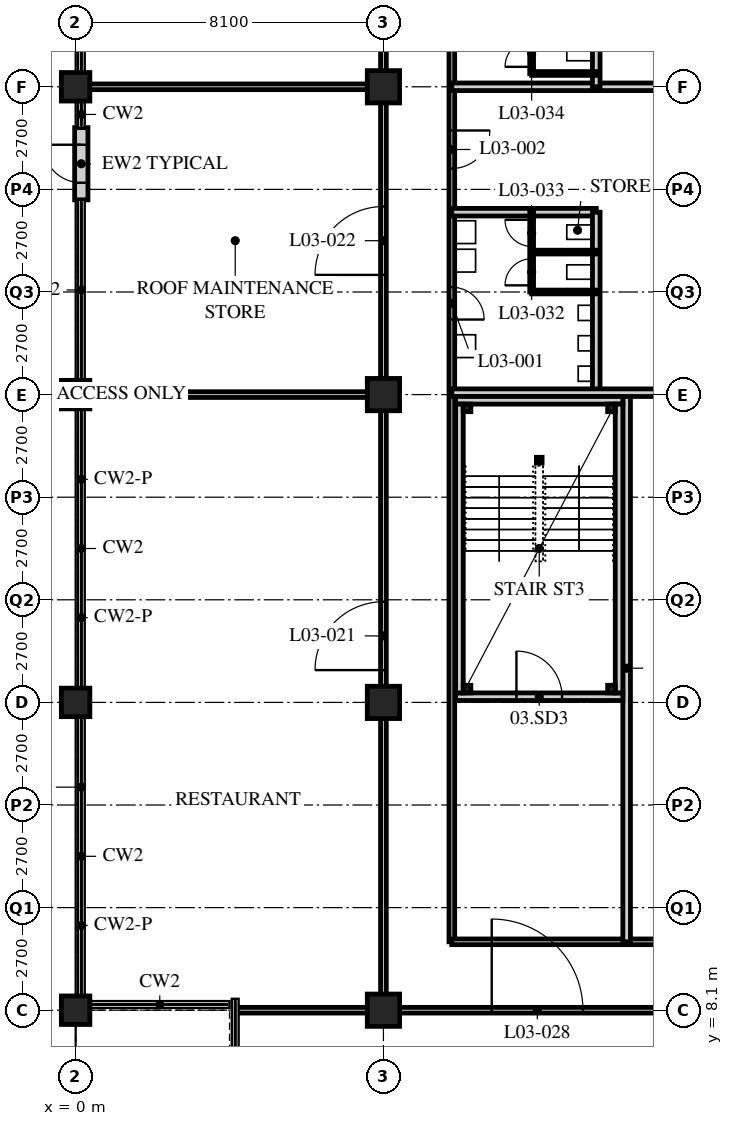
"""IFC4 building model, lengths in metres.
Left out: names, types, materials, properties, quantities, classifications, styles, units other than length and angle.
Written with IfcOpenShell. Run it as: python <this file> out.ifc"""

import sys

from ifc_helpers import new_model, si_unit, direction, frame, frame_2d, origin, origin_2d, place, context, subcontext, project, spatial, rectangle, hollow_rectangle, extrude, element, fill, save


model = new_model("IFC4")
c1 = context("Model", 3, precision=1e-05, world=origin(), true_north=direction((0.0, 1.0)))
c2 = subcontext(c1, "Body", "Model", "MODEL_VIEW")
j1 = project(units=[si_unit("LENGTHUNIT", "METRE"), si_unit("PLANEANGLEUNIT", "RADIAN")], contexts=[c1])
p1 = place(None, origin())
s1 = spatial("IfcSite", under=j1, at=p1, CompositionType="ELEMENT")
p2 = place(p1, origin())
s2 = spatial("IfcBuilding", under=s1, at=p2, CompositionType="ELEMENT")
p3 = place(p2, frame((0.0, 0.0, 16.8)))
s3 = spatial("IfcBuildingStorey", under=s2, at=p3, CompositionType="ELEMENT", Elevation=16.8)
for number, where, z_axis, x_axis in (
    (1, (0.0, 8.1, 0.0), (0.0, 0.0, 1.0), (1.0, 0.0, 0.0)),
    (2, (0.0, 16.2, 0.0), (0.0, 0.0, 1.0), (1.0, 0.0, 0.0)),
    (3, (0.0, 24.3, 0.0), (0.0, 0.0, 1.0), (1.0, 0.0, 0.0)),
    (4, (0.0, 32.4, 0.0), (0.0, 0.0, 1.0), (1.0, 0.0, 0.0)),
):
    element("IfcColumn", number, at=place(p3, frame(where, z_axis=z_axis, x_axis=x_axis)), inside=s3, PredefinedType="COLUMN", context=c2, shape_type="SweptSolid", body=[
        extrude(hollow_rectangle(XDim=0.75, YDim=0.75, WallThickness=0.07, at=origin_2d()), origin(), (0.0, 0.0, 1.0), 5.4),
    ])
for number, where, z_axis, x_axis in (
    (5, (8.1, 8.1, 0.0), (0.0, 0.0, 1.0), (1.0, 0.0, 0.0)),
    (6, (8.1, 16.2, 0.0), (0.0, 0.0, 1.0), (1.0, 0.0, 0.0)),
    (7, (8.1, 24.3, 0.0), (0.0, 0.0, 1.0), (1.0, 0.0, 0.0)),
    (8, (8.1, 32.4, 0.0), (0.0, 0.0, 1.0), (1.0, 0.0, 0.0)),
):
    element("IfcColumn", number, at=place(p3, frame(where, z_axis=z_axis, x_axis=x_axis)), inside=s3, PredefinedType="COLUMN", context=c2, shape_type="SweptSolid", body=[
        extrude(hollow_rectangle(XDim=0.85, YDim=0.85, WallThickness=0.085, at=origin_2d()), origin(), (0.0, 0.0, 1.0), 5.4),
    ])
p4 = place(p3, frame((0.15, 31.325, 0.0), z_axis=(0.0, 0.0, 1.0), x_axis=(0.0, -1.0, 0.0)))
e9 = element("IfcWall", 9, at=p4, inside=s3, PredefinedType="SOLIDWALL", context=c2, shape_type="SweptSolid", body=[
    extrude(rectangle(XDim=1.9, YDim=0.35, at=frame_2d((0.95, 0.0))), origin(), (0.0, 0.0, 1.0), 5.15),
])
p5 = place(p4, frame((0.45, 0.0, 0.0)))
e10 = element("IfcOpeningElement", 10, at=p5, cuts=e9, PredefinedType="OPENING", context=c2, shape_type="SweptSolid", body=[
    extrude(rectangle(XDim=1.0, YDim=2.1, at=frame_2d((0.5, 1.05))), frame((0.0, 0.185, 0.0), z_axis=(0.0, -1.0, 0.0), x_axis=(1.0, 0.0, 0.0)), (0.0, 0.0, 1.0), 0.37),
])
p6 = place(p3, frame((8.1, 8.1, 0.0), z_axis=(0.0, 0.0, 1.0), x_axis=(1.0, 0.0, 0.0)))
e11 = element("IfcWall", 11, at=p6, inside=s3, PredefinedType="PARTITIONING", context=c2, shape_type="SweptSolid", body=[
    extrude(rectangle(XDim=48.6, YDim=0.15, at=frame_2d((24.3, 0.0))), origin(), (0.0, 0.0, 1.0), 4.538),
])
p7 = place(p6, frame((11.25, 0.0, 0.0)))
e12 = element("IfcOpeningElement", 12, at=p7, cuts=e11, PredefinedType="OPENING", context=c2, shape_type="SweptSolid", body=[
    extrude(rectangle(XDim=1.8, YDim=2.4, at=frame_2d((0.9, 1.2))), frame((0.0, 0.085, 0.0), z_axis=(0.0, -1.0, 0.0), x_axis=(1.0, 0.0, 0.0)), (0.0, 0.0, 1.0), 0.17),
])
p8 = place(p6, frame((19.05, 0.0, 0.0)))
e13 = element("IfcOpeningElement", 13, at=p8, cuts=e11, PredefinedType="OPENING", context=c2, shape_type="SweptSolid", body=[
    extrude(rectangle(XDim=2.4, YDim=2.7, at=frame_2d((1.2, 1.35))), frame((0.0, 0.085, 0.0), z_axis=(0.0, -1.0, 0.0), x_axis=(1.0, 0.0, 0.0)), (0.0, 0.0, 1.0), 0.17),
])
p9 = place(p6, frame((27.15, 0.0, 0.0)))
e14 = element("IfcOpeningElement", 14, at=p9, cuts=e11, PredefinedType="OPENING", context=c2, shape_type="SweptSolid", body=[
    extrude(rectangle(XDim=2.4, YDim=2.7, at=frame_2d((1.2, 1.35))), frame((0.0, 0.085, 0.0), z_axis=(0.0, -1.0, 0.0), x_axis=(1.0, 0.0, 0.0)), (0.0, 0.0, 1.0), 0.17),
])
p10 = place(p6, frame((35.25, 0.0, 0.0)))
e15 = element("IfcOpeningElement", 15, at=p10, cuts=e11, PredefinedType="OPENING", context=c2, shape_type="SweptSolid", body=[
    extrude(rectangle(XDim=2.4, YDim=2.7, at=frame_2d((1.2, 1.35))), frame((0.0, 0.085, 0.0), z_axis=(0.0, -1.0, 0.0), x_axis=(1.0, 0.0, 0.0)), (0.0, 0.0, 1.0), 0.17),
])
p11 = place(p6, frame((2.85, 0.0, 0.0)))
e16 = element("IfcOpeningElement", 16, at=p11, cuts=e11, PredefinedType="OPENING", context=c2, shape_type="SweptSolid", body=[
    extrude(rectangle(XDim=2.4, YDim=2.7, at=frame_2d((1.2, 1.35))), frame((0.0, 0.085, 0.0), z_axis=(0.0, -1.0, 0.0), x_axis=(1.0, 0.0, 0.0)), (0.0, 0.0, 1.0), 0.17),
])
p12 = place(p6, frame((43.35, 0.0, 0.0)))
e17 = element("IfcOpeningElement", 17, at=p12, cuts=e11, PredefinedType="OPENING", context=c2, shape_type="SweptSolid", body=[
    extrude(rectangle(XDim=2.4, YDim=2.7, at=frame_2d((1.2, 1.35))), frame((0.0, 0.085, 0.0), z_axis=(0.0, -1.0, 0.0), x_axis=(1.0, 0.0, 0.0)), (0.0, 0.0, 1.0), 0.17),
])
p13 = place(p3, frame((8.1, 8.1, 0.0), z_axis=(0.0, 0.0, 1.0), x_axis=(0.0, 1.0, 0.0)))
e18 = element("IfcWall", 18, at=p13, inside=s3, PredefinedType="PARTITIONING", context=c2, shape_type="SweptSolid", body=[
    extrude(rectangle(XDim=34.35, YDim=0.15, at=frame_2d((17.175, 0.0))), origin(), (0.0, 0.0, 1.0), 4.538),
])
p14 = place(p13, frame((8.95, 0.0, 0.0)))
e19 = element("IfcOpeningElement", 19, at=p14, cuts=e18, PredefinedType="OPENING", context=c2, shape_type="SweptSolid", body=[
    extrude(rectangle(XDim=1.8, YDim=2.4, at=frame_2d((0.9, 1.2))), frame((0.0, 0.085, 0.0), z_axis=(0.0, -1.0, 0.0), x_axis=(1.0, 0.0, 0.0)), (0.0, 0.0, 1.0), 0.17),
])
p15 = place(p13, frame((19.35, 0.0, 0.0)))
e20 = element("IfcOpeningElement", 20, at=p15, cuts=e18, PredefinedType="OPENING", context=c2, shape_type="SweptSolid", body=[
    extrude(rectangle(XDim=1.8, YDim=2.4, at=frame_2d((0.9, 1.2))), frame((0.0, 0.085, 0.0), z_axis=(0.0, -1.0, 0.0), x_axis=(1.0, 0.0, 0.0)), (0.0, 0.0, 1.0), 0.17),
])
p16 = place(p13, frame((27.15, 0.0, 0.0)))
e21 = element("IfcOpeningElement", 21, at=p16, cuts=e18, PredefinedType="OPENING", context=c2, shape_type="SweptSolid", body=[
    extrude(rectangle(XDim=2.4, YDim=2.7, at=frame_2d((1.2, 1.35))), frame((0.0, 0.085, 0.0), z_axis=(0.0, -1.0, 0.0), x_axis=(1.0, 0.0, 0.0)), (0.0, 0.0, 1.0), 0.17),
])
p17 = place(p3, frame((9.9, 40.65, 0.0), z_axis=(0.0, 0.0, 1.0), x_axis=(0.0, -1.0, 0.0)))
e22 = element("IfcWall", 22, at=p17, inside=s3, PredefinedType="PARTITIONING", context=c2, shape_type="SweptSolid", body=[
    extrude(rectangle(XDim=30.75, YDim=0.15, at=frame_2d((15.375, 0.0))), origin(), (0.0, 0.0, 1.0), 5.15),
])
p18 = place(p17, frame((13.525, 0.0, 0.0)))
e23 = element("IfcOpeningElement", 23, at=p18, cuts=e22, PredefinedType="OPENING", context=c2, shape_type="SweptSolid", body=[
    extrude(rectangle(XDim=0.85, YDim=2.1, at=frame_2d((0.425, 1.05))), frame((0.0, 0.085, 0.0), z_axis=(0.0, -1.0, 0.0), x_axis=(1.0, 0.0, 0.0)), (0.0, 0.0, 1.0), 0.17),
])
p19 = place(p17, frame((9.4, 0.0, 0.0)))
e24 = element("IfcOpeningElement", 24, at=p19, cuts=e22, PredefinedType="OPENING", context=c2, shape_type="SweptSolid", body=[
    extrude(rectangle(XDim=1.0, YDim=2.1, at=frame_2d((0.5, 1.05))), frame((0.0, 0.085, 0.0), z_axis=(0.0, -1.0, 0.0), x_axis=(1.0, 0.0, 0.0)), (0.0, 0.0, 1.0), 0.17),
])
p20 = place(p17, frame((5.025, 0.0, 0.0)))
e25 = element("IfcOpeningElement", 25, at=p20, cuts=e22, PredefinedType="OPENING", context=c2, shape_type="SweptSolid", body=[
    extrude(rectangle(XDim=0.85, YDim=2.1, at=frame_2d((0.425, 1.05))), frame((0.0, 0.085, 0.0), z_axis=(0.0, -1.0, 0.0), x_axis=(1.0, 0.0, 0.0)), (0.0, 0.0, 1.0), 0.17),
])
p21 = place(p17, frame((0.9, 0.0, 0.0)))
e26 = element("IfcOpeningElement", 26, at=p21, cuts=e22, PredefinedType="OPENING", context=c2, shape_type="SweptSolid", body=[
    extrude(rectangle(XDim=1.0, YDim=2.1, at=frame_2d((0.5, 1.05))), frame((0.0, 0.085, 0.0), z_axis=(0.0, -1.0, 0.0), x_axis=(1.0, 0.0, 0.0)), (0.0, 0.0, 1.0), 0.17),
])
p22 = place(p3, frame((9.9, 9.9, 0.0), z_axis=(0.0, 0.0, 1.0), x_axis=(1.0, 0.0, 0.0)))
e27 = element("IfcWall", 27, at=p22, inside=s3, PredefinedType="PARTITIONING", context=c2, shape_type="SweptSolid", body=[
    extrude(rectangle(XDim=17.24, YDim=0.15, at=frame_2d((8.62, 0.0))), origin(), (0.0, 0.0, 1.0), 5.15),
])
p23 = place(p22, frame((10.425, 0.0, 0.0)))
e28 = element("IfcOpeningElement", 28, at=p23, cuts=e27, PredefinedType="OPENING", context=c2, shape_type="SweptSolid", body=[
    extrude(rectangle(XDim=1.0, YDim=2.1, at=frame_2d((0.5, 1.05))), frame((0.0, 0.085, 0.0), z_axis=(0.0, -1.0, 0.0), x_axis=(1.0, 0.0, 0.0)), (0.0, 0.0, 1.0), 0.17),
])
p24 = place(p3, frame((9.9, 32.4, 0.0), z_axis=(0.0, 0.0, 1.0), x_axis=(1.0, 0.0, 0.0)))
e29 = element("IfcWall", 29, at=p24, inside=s3, PredefinedType="SOLIDWALL", context=c2, shape_type="SweptSolid", body=[
    extrude(rectangle(XDim=6.3, YDim=0.2, at=frame_2d((3.15, 0.0))), origin(), (0.0, 0.0, 1.0), 4.538),
])
p25 = place(p3, frame((9.9, 29.1, 0.0), z_axis=(0.0, 0.0, 1.0), x_axis=(1.0, 0.0, 0.0)))
e30 = element("IfcWall", 30, at=p25, inside=s3, PredefinedType="SOLIDWALL", context=c2, shape_type="SweptSolid", body=[
    extrude(rectangle(XDim=3.8, YDim=0.2, at=frame_2d((1.9, 0.0))), origin(), (0.0, 0.0, 1.0), 5.15),
])
p26 = place(p3, frame((13.7, 24.3, 0.0), z_axis=(0.0, 0.0, 1.0), x_axis=(0.0, 1.0, 0.0)))
e31 = element("IfcWall", 31, at=p26, inside=s3, PredefinedType="SOLIDWALL", context=c2, shape_type="SweptSolid", body=[
    extrude(rectangle(XDim=4.8, YDim=0.2, at=frame_2d((2.4, 0.0))), origin(), (0.0, 0.0, 1.0), 5.15),
])
p27 = place(p3, frame((13.7, 32.4, 0.0), z_axis=(0.0, 0.0, 1.0), x_axis=(0.0, 1.0, 0.0)))
e32 = element("IfcWall", 32, at=p27, inside=s3, PredefinedType="SOLIDWALL", context=c2, shape_type="SweptSolid", body=[
    extrude(rectangle(XDim=5.6, YDim=0.2, at=frame_2d((2.8, 0.0))), origin(), (0.0, 0.0, 1.0), 5.15),
])
p28 = place(p3, frame((14.5, 9.9, 0.0), z_axis=(0.0, 0.0, 1.0), x_axis=(0.0, 1.0, 0.0)))
e33 = element("IfcWall", 33, at=p28, inside=s3, PredefinedType="SOLIDWALL", context=c2, shape_type="SweptSolid", body=[
    extrude(rectangle(XDim=14.4, YDim=0.2, at=frame_2d((7.2, 0.0))), origin(), (0.0, 0.0, 1.0), 5.15),
])
p29 = place(p3, frame((9.9, 24.35, 0.0), z_axis=(0.0, 0.0, 1.0), x_axis=(1.0, 0.0, 0.0)))
e34 = element("IfcWall", 34, at=p29, inside=s3, PredefinedType="SOLIDWALL", context=c2, shape_type="SweptSolid", body=[
    extrude(rectangle(XDim=6.3, YDim=0.2, at=frame_2d((3.15, 0.0))), origin(), (0.0, 0.0, 1.0), 4.538),
])
for number, where, z_axis, x_axis in (
    (35, (8.1, 24.3, 0.0), (0.0, 0.0, 1.0), (-1.0, 0.0, 0.0)),
    (36, (8.1, 32.4, 0.0), (0.0, 0.0, 1.0), (-1.0, 0.0, 0.0)),
):
    element("IfcWall", number, at=place(p3, frame(where, z_axis=z_axis, x_axis=x_axis)), inside=s3, PredefinedType="PARTITIONING", context=c2, shape_type="SweptSolid", body=[
        extrude(rectangle(XDim=7.8, YDim=0.15, at=frame_2d((3.9, 0.0))), origin(), (0.0, 0.0, 1.0), 4.538),
    ])
p30 = place(p3, frame((4.218, 8.1, 0.0), z_axis=(0.0, 0.0, 1.0), x_axis=(1.0, 0.0, 0.0)))
e37 = element("IfcWall", 37, at=p30, inside=s3, PredefinedType="PARTITIONING", context=c2, shape_type="SweptSolid", body=[
    extrude(rectangle(XDim=3.882, YDim=0.15, at=frame_2d((1.941, 0.0))), origin(), (0.0, 0.0, 1.0), 4.538),
])
p31 = place(p3, frame((12.0, 27.0, 0.0), z_axis=(0.0, 0.0, 1.0), x_axis=(0.0, 1.0, 0.0)))
e38 = element("IfcWall", 38, at=p31, inside=s3, PredefinedType="PARTITIONING", context=c2, shape_type="SweptSolid", body=[
    extrude(rectangle(XDim=2.1, YDim=0.1, at=frame_2d((1.05, 0.0))), origin(), (0.0, 0.0, 1.0), 5.15),
])
p32 = place(p31, frame((0.175, 0.0, 0.0)))
e39 = element("IfcOpeningElement", 39, at=p32, cuts=e38, PredefinedType="OPENING", context=c2, shape_type="SweptSolid", body=[
    extrude(rectangle(XDim=0.7, YDim=2.0, at=frame_2d((0.35, 1.0))), frame((0.0, 0.06, 0.0), z_axis=(0.0, -1.0, 0.0), x_axis=(1.0, 0.0, 0.0)), (0.0, 0.0, 1.0), 0.12),
])
p33 = place(p31, frame((1.2, 0.0, 0.0)))
e40 = element("IfcOpeningElement", 40, at=p33, cuts=e38, PredefinedType="OPENING", context=c2, shape_type="SweptSolid", body=[
    extrude(rectangle(XDim=0.7, YDim=2.0, at=frame_2d((0.35, 1.0))), frame((0.0, 0.06, 0.0), z_axis=(0.0, -1.0, 0.0), x_axis=(1.0, 0.0, 0.0)), (0.0, 0.0, 1.0), 0.12),
])
for number, where, z_axis, x_axis in (
    (41, (12.0, 27.0, 0.0), (0.0, 0.0, 1.0), (1.0, 0.0, 0.0)),
    (42, (12.0, 28.05, 0.0), (0.0, 0.0, 1.0), (1.0, 0.0, 0.0)),
):
    element("IfcWall", number, at=place(p3, frame(where, z_axis=z_axis, x_axis=x_axis)), inside=s3, PredefinedType="PARTITIONING", context=c2, shape_type="SweptSolid", body=[
        extrude(rectangle(XDim=1.7, YDim=0.1, at=frame_2d((0.85, 0.0))), origin(), (0.0, 0.0, 1.0), 5.15),
    ])
p34 = place(p3, frame((12.0, 32.75, 0.0), z_axis=(0.0, 0.0, 1.0), x_axis=(0.0, 1.0, 0.0)))
e43 = element("IfcWall", 43, at=p34, inside=s3, PredefinedType="PARTITIONING", context=c2, shape_type="SweptSolid", body=[
    extrude(rectangle(XDim=5.25, YDim=0.1, at=frame_2d((2.625, 0.0))), origin(), (0.0, 0.0, 1.0), 5.15),
])
p35 = place(p34, frame((0.175, 0.0, 0.0)))
e44 = element("IfcOpeningElement", 44, at=p35, cuts=e43, PredefinedType="OPENING", context=c2, shape_type="SweptSolid", body=[
    extrude(rectangle(XDim=0.7, YDim=2.0, at=frame_2d((0.35, 1.0))), frame((0.0, 0.06, 0.0), z_axis=(0.0, -1.0, 0.0), x_axis=(1.0, 0.0, 0.0)), (0.0, 0.0, 1.0), 0.12),
])
p36 = place(p34, frame((1.225, 0.0, 0.0)))
e45 = element("IfcOpeningElement", 45, at=p36, cuts=e43, PredefinedType="OPENING", context=c2, shape_type="SweptSolid", body=[
    extrude(rectangle(XDim=0.7, YDim=2.0, at=frame_2d((0.35, 1.0))), frame((0.0, 0.06, 0.0), z_axis=(0.0, -1.0, 0.0), x_axis=(1.0, 0.0, 0.0)), (0.0, 0.0, 1.0), 0.12),
])
p37 = place(p34, frame((2.275, 0.0, 0.0)))
e46 = element("IfcOpeningElement", 46, at=p37, cuts=e43, PredefinedType="OPENING", context=c2, shape_type="SweptSolid", body=[
    extrude(rectangle(XDim=0.7, YDim=2.0, at=frame_2d((0.35, 1.0))), frame((0.0, 0.06, 0.0), z_axis=(0.0, -1.0, 0.0), x_axis=(1.0, 0.0, 0.0)), (0.0, 0.0, 1.0), 0.12),
])
p38 = place(p34, frame((3.325, 0.0, 0.0)))
e47 = element("IfcOpeningElement", 47, at=p38, cuts=e43, PredefinedType="OPENING", context=c2, shape_type="SweptSolid", body=[
    extrude(rectangle(XDim=0.7, YDim=2.0, at=frame_2d((0.35, 1.0))), frame((0.0, 0.06, 0.0), z_axis=(0.0, -1.0, 0.0), x_axis=(1.0, 0.0, 0.0)), (0.0, 0.0, 1.0), 0.12),
])
p39 = place(p34, frame((4.35, 0.0, 0.0)))
e48 = element("IfcOpeningElement", 48, at=p39, cuts=e43, PredefinedType="OPENING", context=c2, shape_type="SweptSolid", body=[
    extrude(rectangle(XDim=0.7, YDim=2.0, at=frame_2d((0.35, 1.0))), frame((0.0, 0.06, 0.0), z_axis=(0.0, -1.0, 0.0), x_axis=(1.0, 0.0, 0.0)), (0.0, 0.0, 1.0), 0.12),
])
p40 = place(p3, frame((12.0, 32.75, 0.0), z_axis=(0.0, 0.0, 1.0), x_axis=(1.0, 0.0, 0.0)))
e49 = element("IfcWall", 49, at=p40, inside=s3, PredefinedType="PARTITIONING", context=c2, shape_type="SweptSolid", body=[
    extrude(rectangle(XDim=1.7, YDim=0.1, at=frame_2d((0.85, 0.0))), origin(), (0.0, 0.0, 1.0), 5.15),
])
p41 = place(p3, frame((10.0, 16.35, 0.0), z_axis=(0.0, 0.0, 1.0), x_axis=(1.0, 0.0, 0.0)))
e50 = element("IfcWall", 50, at=p41, inside=s3, PredefinedType="SOLIDWALL", context=c2, shape_type="SweptSolid", body=[
    extrude(rectangle(XDim=4.4, YDim=0.2, at=frame_2d((2.2, 0.0))), origin(), (0.0, 0.0, 1.0), 4.538),
])
p42 = place(p41, frame((1.6, 0.0, 0.0)))
e51 = element("IfcOpeningElement", 51, at=p42, cuts=e50, PredefinedType="OPENING", context=c2, shape_type="SweptSolid", body=[
    extrude(rectangle(XDim=1.2, YDim=2.1, at=frame_2d((0.6, 1.05))), frame((0.0, 0.11, 0.0), z_axis=(0.0, -1.0, 0.0), x_axis=(1.0, 0.0, 0.0)), (0.0, 0.0, 1.0), 0.22),
])
p43 = place(p3, frame((10.0, 24.15, 0.0), z_axis=(0.0, 0.0, 1.0), x_axis=(1.0, 0.0, 0.0)))
e52 = element("IfcWall", 52, at=p43, inside=s3, PredefinedType="SOLIDWALL", context=c2, shape_type="SweptSolid", body=[
    extrude(rectangle(XDim=4.4, YDim=0.2, at=frame_2d((2.2, 0.0))), origin(), (0.0, 0.0, 1.0), 4.538),
])
for number, where, z_axis, x_axis in (
    (53, (10.1, 16.45, 0.0), (0.0, 0.0, 1.0), (0.0, 1.0, 0.0)),
    (54, (14.3, 16.45, 0.0), (0.0, 0.0, 1.0), (0.0, 1.0, 0.0)),
):
    element("IfcWall", number, at=place(p3, frame(where, z_axis=z_axis, x_axis=x_axis)), inside=s3, PredefinedType="SOLIDWALL", context=c2, shape_type="SweptSolid", body=[
        extrude(rectangle(XDim=7.6, YDim=0.2, at=frame_2d((3.8, 0.0))), origin(), (0.0, 0.0, 1.0), 5.15),
    ])
for number, where, z_axis, x_axis in (
    (55, (10.3, 23.95, 0.0), (0.0, 0.0, 1.0), (1.0, 0.0, 0.0)),
    (56, (14.1, 23.95, 0.0), (0.0, 0.0, 1.0), (1.0, 0.0, 0.0)),
    (57, (10.3, 16.55, 0.0), (0.0, 0.0, 1.0), (1.0, 0.0, 0.0)),
    (58, (14.1, 16.55, 0.0), (0.0, 0.0, 1.0), (1.0, 0.0, 0.0)),
):
    element("IfcColumn", number, at=place(p3, frame(where, z_axis=z_axis, x_axis=x_axis)), inside=s3, PredefinedType="COLUMN", context=c2, shape_type="SweptSolid", body=[
        extrude(hollow_rectangle(XDim=0.2, YDim=0.2, WallThickness=0.012, at=origin_2d()), origin(), (0.0, 0.0, 1.0), 5.4),
    ])
p44 = place(p3, frame((12.2, 22.575, 0.0), z_axis=(0.0, 0.0, 1.0), x_axis=(1.0, 0.0, 0.0)))
e59 = element("IfcColumn", 59, at=p44, inside=s3, PredefinedType="COLUMN", context=c2, shape_type="SweptSolid", body=[
    extrude(hollow_rectangle(XDim=0.15, YDim=0.15, WallThickness=0.01, at=origin_2d()), origin(), (0.0, 0.0, 1.0), 5.4),
])
p45 = place(p5, origin())
e60 = element("IfcDoor", 60, at=p45, inside=s3, OperationType="SINGLE_SWING_RIGHT", PredefinedType="DOOR", context=c2, shape_type="SweptSolid", body=[
    extrude(rectangle(XDim=1.0, YDim=2.1, at=frame_2d((0.5, 1.05))), frame((0.0, 0.025, 0.0), z_axis=(0.0, -1.0, 0.0), x_axis=(1.0, 0.0, 0.0)), (0.0, 0.0, 1.0), 0.05),
])
fill(e10, e60)
p46 = place(p18, origin())
e61 = element("IfcDoor", 61, at=p46, inside=s3, OperationType="SINGLE_SWING_RIGHT", PredefinedType="DOOR", context=c2, shape_type="SweptSolid", body=[
    extrude(rectangle(XDim=0.85, YDim=2.1, at=frame_2d((0.425, 1.05))), frame((0.0, 0.025, 0.0), z_axis=(0.0, -1.0, 0.0), x_axis=(1.0, 0.0, 0.0)), (0.0, 0.0, 1.0), 0.05),
])
fill(e23, e61)
p47 = place(p19, origin())
e62 = element("IfcDoor", 62, at=p47, inside=s3, OperationType="SINGLE_SWING_LEFT", PredefinedType="DOOR", context=c2, shape_type="SweptSolid", body=[
    extrude(rectangle(XDim=1.0, YDim=2.1, at=frame_2d((0.5, 1.05))), frame((0.0, 0.025, 0.0), z_axis=(0.0, -1.0, 0.0), x_axis=(1.0, 0.0, 0.0)), (0.0, 0.0, 1.0), 0.05),
])
fill(e24, e62)
p48 = place(p14, origin())
e63 = element("IfcDoor", 63, at=p48, inside=s3, OperationType="DOUBLE_DOOR_SINGLE_SWING", PredefinedType="DOOR", context=c2, shape_type="SweptSolid", body=[
    extrude(rectangle(XDim=1.8, YDim=2.4, at=frame_2d((0.9, 1.2))), frame((0.0, 0.025, 0.0), z_axis=(0.0, -1.0, 0.0), x_axis=(1.0, 0.0, 0.0)), (0.0, 0.0, 1.0), 0.05),
])
fill(e19, e63)
p49 = place(p15, origin())
e64 = element("IfcDoor", 64, at=p49, inside=s3, OperationType="DOUBLE_DOOR_SINGLE_SWING", PredefinedType="DOOR", context=c2, shape_type="SweptSolid", body=[
    extrude(rectangle(XDim=1.8, YDim=2.4, at=frame_2d((0.9, 1.2))), frame((0.0, 0.025, 0.0), z_axis=(0.0, -1.0, 0.0), x_axis=(1.0, 0.0, 0.0)), (0.0, 0.0, 1.0), 0.05),
])
fill(e20, e64)
p50 = place(p11, origin())
e65 = element("IfcDoor", 65, at=p50, inside=s3, OperationType="DOUBLE_DOOR_SINGLE_SWING", PredefinedType="DOOR", context=c2, shape_type="SweptSolid", body=[
    extrude(rectangle(XDim=2.4, YDim=2.7, at=frame_2d((1.2, 1.35))), frame((0.0, 0.025, 0.0), z_axis=(0.0, -1.0, 0.0), x_axis=(1.0, 0.0, 0.0)), (0.0, 0.0, 1.0), 0.05),
])
fill(e16, e65)
p51 = place(p32, origin())
e66 = element("IfcDoor", 66, at=p51, inside=s3, OperationType="SINGLE_SWING_LEFT", PredefinedType="DOOR", context=c2, shape_type="SweptSolid", body=[
    extrude(rectangle(XDim=0.7, YDim=2.0, at=frame_2d((0.35, 1.0))), frame((0.0, 0.025, 0.0), z_axis=(0.0, -1.0, 0.0), x_axis=(1.0, 0.0, 0.0)), (0.0, 0.0, 1.0), 0.05),
])
fill(e39, e66)
p52 = place(p33, origin())
e67 = element("IfcDoor", 67, at=p52, inside=s3, OperationType="SINGLE_SWING_RIGHT", PredefinedType="DOOR", context=c2, shape_type="SweptSolid", body=[
    extrude(rectangle(XDim=0.7, YDim=2.0, at=frame_2d((0.35, 1.0))), frame((0.0, 0.025, 0.0), z_axis=(0.0, -1.0, 0.0), x_axis=(1.0, 0.0, 0.0)), (0.0, 0.0, 1.0), 0.05),
])
fill(e40, e67)
p53 = place(p35, origin())
e68 = element("IfcDoor", 68, at=p53, inside=s3, OperationType="SINGLE_SWING_LEFT", PredefinedType="DOOR", context=c2, shape_type="SweptSolid", body=[
    extrude(rectangle(XDim=0.7, YDim=2.0, at=frame_2d((0.35, 1.0))), frame((0.0, 0.025, 0.0), z_axis=(0.0, -1.0, 0.0), x_axis=(1.0, 0.0, 0.0)), (0.0, 0.0, 1.0), 0.05),
])
fill(e44, e68)
p54 = place(p42, origin())
e69 = element("IfcDoor", 69, at=p54, inside=s3, OperationType="SINGLE_SWING_LEFT", PredefinedType="DOOR", context=c2, shape_type="SweptSolid", body=[
    extrude(rectangle(XDim=1.2, YDim=2.1, at=frame_2d((0.6, 1.05))), frame((0.0, 0.025, 0.0), z_axis=(0.0, -1.0, 0.0), x_axis=(1.0, 0.0, 0.0)), (0.0, 0.0, 1.0), 0.05),
])
fill(e51, e69)
save(model, sys.argv[1])
